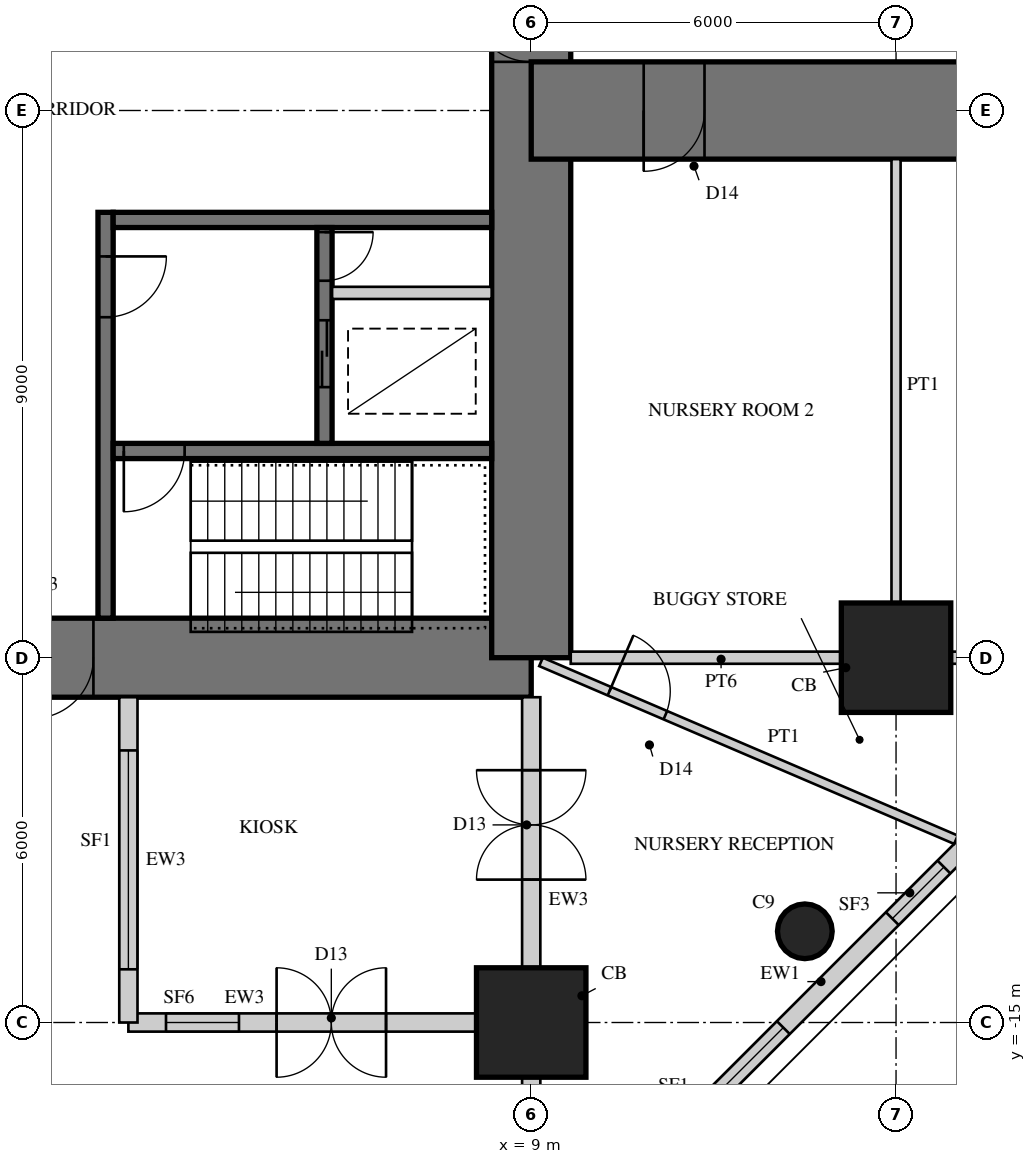
"""IFC4 building model, lengths in metres.
Left out: names, types, materials, properties, quantities, classifications, styles, units other than length and angle.
Written with IfcOpenShell. Run it as: python <this file> out.ifc"""

import sys

from ifc_helpers import new_model, si_unit, direction, frame, frame_2d, origin, origin_2d, place, context, subcontext, project, spatial, rectangle, hollow_rectangle, circle, extrude, element, fill, save


model = new_model("IFC4")
c1 = context("Model", 3, precision=1e-05, world=origin(), true_north=direction((0.0, 1.0)))
c2 = subcontext(c1, "Body", "Model", "MODEL_VIEW")
j1 = project(units=[si_unit("LENGTHUNIT", "METRE"), si_unit("PLANEANGLEUNIT", "RADIAN")], contexts=[c1])
p1 = place(None, origin())
s1 = spatial("IfcSite", under=j1, at=p1, CompositionType="ELEMENT")
p2 = place(p1, origin())
s2 = spatial("IfcBuilding", under=s1, at=p2, CompositionType="ELEMENT")
p3 = place(p2, origin())
s3 = spatial("IfcBuildingStorey", under=s2, at=p3, CompositionType="ELEMENT", Elevation=0.0)
p4 = place(p3, frame((-9.0, -9.0, 0.0), z_axis=(0.0, 0.0, 1.0), x_axis=(1.0, 0.0, 0.0)))
e1 = element("IfcWall", 1, at=p4, inside=s3, PredefinedType="SHEAR", context=c2, shape_type="SweptSolid", body=[
    extrude(rectangle(XDim=18.0, YDim=1.3, at=frame_2d((9.0, 0.0))), origin(), (0.0, 0.0, 1.0), 5.0),
])
p5 = place(p4, frame((9.8, 0.0, 0.0)))
e2 = element("IfcOpeningElement", 2, at=p5, cuts=e1, PredefinedType="OPENING", context=c2, shape_type="SweptSolid", body=[
    extrude(rectangle(XDim=1.0, YDim=2.4, at=frame_2d((0.5, 1.2))), frame((0.0, 0.66, 0.0), z_axis=(0.0, -1.0, 0.0), x_axis=(1.0, 0.0, 0.0)), (0.0, 0.0, 1.0), 1.32),
])
p6 = place(p3, frame((9.0, -9.0, 0.0), z_axis=(0.0, 0.0, 1.0), x_axis=(0.0, 1.0, 0.0)))
e3 = element("IfcWall", 3, at=p6, inside=s3, PredefinedType="SHEAR", context=c2, shape_type="SweptSolid", body=[
    extrude(rectangle(XDim=18.0, YDim=1.3, at=frame_2d((9.0, 0.0))), origin(), (0.0, 0.0, 1.0), 5.0),
])
p7 = place(p6, frame((9.8, 0.0, 0.0)))
e4 = element("IfcOpeningElement", 4, at=p7, cuts=e3, PredefinedType="OPENING", context=c2, shape_type="SweptSolid", body=[
    extrude(rectangle(XDim=1.0, YDim=2.4, at=frame_2d((0.5, 1.2))), frame((0.0, 0.66, 0.0), z_axis=(0.0, -1.0, 0.0), x_axis=(1.0, 0.0, 0.0)), (0.0, 0.0, 1.0), 1.32),
])
p8 = place(p3, frame((2.0, -1.675, 0.0), z_axis=(0.0, 0.0, 1.0), x_axis=(0.0, -1.0, 0.0)))
e5 = element("IfcWall", 5, at=p8, inside=s3, PredefinedType="SHEAR", context=c2, shape_type="SweptSolid", body=[
    extrude(rectangle(XDim=6.675, YDim=0.25, at=frame_2d((3.337, 0.0))), origin(), (0.0, 0.0, 1.0), 5.0),
])
p9 = place(p8, frame((0.725, 0.0, 0.0)))
e6 = element("IfcOpeningElement", 6, at=p9, cuts=e5, PredefinedType="OPENING", context=c2, shape_type="SweptSolid", body=[
    extrude(rectangle(XDim=1.0, YDim=2.1, at=frame_2d((0.5, 1.05))), frame((0.0, 0.135, 0.0), z_axis=(0.0, -1.0, 0.0), x_axis=(1.0, 0.0, 0.0)), (0.0, 0.0, 1.0), 0.27),
])
p10 = place(p3, frame((2.125, -1.8, 0.0), z_axis=(0.0, 0.0, 1.0), x_axis=(1.0, 0.0, 0.0)))
e7 = element("IfcWall", 7, at=p10, inside=s3, PredefinedType="SHEAR", context=c2, shape_type="SweptSolid", body=[
    extrude(rectangle(XDim=6.225, YDim=0.25, at=frame_2d((3.113, 0.0))), origin(), (0.0, 0.0, 1.0), 5.0),
])
p11 = place(p3, frame((2.125, -5.6, 0.0), z_axis=(0.0, 0.0, 1.0), x_axis=(1.0, 0.0, 0.0)))
e8 = element("IfcWall", 8, at=p11, inside=s3, PredefinedType="SHEAR", context=c2, shape_type="SweptSolid", body=[
    extrude(rectangle(XDim=6.225, YDim=0.25, at=frame_2d((3.113, 0.0))), origin(), (0.0, 0.0, 1.0), 5.0),
])
p12 = place(p11, frame((0.175, 0.0, 0.0)))
e9 = element("IfcOpeningElement", 9, at=p12, cuts=e8, PredefinedType="OPENING", context=c2, shape_type="SweptSolid", body=[
    extrude(rectangle(XDim=1.0, YDim=2.1, at=frame_2d((0.5, 1.05))), frame((0.0, 0.135, 0.0), z_axis=(0.0, -1.0, 0.0), x_axis=(1.0, 0.0, 0.0)), (0.0, 0.0, 1.0), 0.27),
])
p13 = place(p3, frame((5.6, -1.925, 0.0), z_axis=(0.0, 0.0, 1.0), x_axis=(0.0, -1.0, 0.0)))
e10 = element("IfcWall", 10, at=p13, inside=s3, PredefinedType="SHEAR", context=c2, shape_type="SweptSolid", body=[
    extrude(rectangle(XDim=3.55, YDim=0.25, at=frame_2d((1.775, 0.0))), origin(), (0.0, 0.0, 1.0), 5.0),
])
p14 = place(p13, frame((1.525, 0.0, 0.0)))
e11 = element("IfcOpeningElement", 11, at=p14, cuts=e10, PredefinedType="OPENING", context=c2, shape_type="SweptSolid", body=[
    extrude(rectangle(XDim=1.1, YDim=2.2, at=frame_2d((0.55, 1.1))), frame((0.0, 0.135, 0.0), z_axis=(0.0, -1.0, 0.0), x_axis=(1.0, 0.0, 0.0)), (0.0, 0.0, 1.0), 0.27),
])
p15 = place(p13, frame((0.075, 0.0, 0.0)))
e12 = element("IfcOpeningElement", 12, at=p15, cuts=e10, PredefinedType="OPENING", context=c2, shape_type="SweptSolid", body=[
    extrude(rectangle(XDim=0.8, YDim=2.1, at=frame_2d((0.4, 1.05))), frame((0.0, 0.135, 0.0), z_axis=(0.0, -1.0, 0.0), x_axis=(1.0, 0.0, 0.0)), (0.0, 0.0, 1.0), 0.27),
])
p16 = place(p3, frame((5.725, -3.0, 0.0), z_axis=(0.0, 0.0, 1.0), x_axis=(1.0, 0.0, 0.0)))
e13 = element("IfcWall", 13, at=p16, inside=s3, PredefinedType="PARTITIONING", context=c2, shape_type="SweptSolid", body=[
    extrude(rectangle(XDim=2.625, YDim=0.2, at=frame_2d((1.312, 0.0))), origin(), (0.0, 0.0, 1.0), 5.0),
])
p17 = place(p3, frame((9.0, 0.0, 0.0), z_axis=(0.0, 0.0, 1.0), x_axis=(1.0, 0.0, 0.0)))
e14 = element("IfcWall", 14, at=p17, inside=s3, PredefinedType="SHEAR", context=c2, shape_type="SweptSolid", body=[
    extrude(rectangle(XDim=18.0, YDim=1.6, at=frame_2d((9.0, 0.0))), origin(), (0.0, 0.0, 1.0), 5.0),
])
p18 = place(p17, frame((1.85, 0.0, 0.0)))
e15 = element("IfcOpeningElement", 15, at=p18, cuts=e14, PredefinedType="OPENING", context=c2, shape_type="SweptSolid", body=[
    extrude(rectangle(XDim=1.0, YDim=2.2, at=frame_2d((0.5, 1.1))), frame((0.0, 0.81, 0.0), z_axis=(0.0, -1.0, 0.0), x_axis=(1.0, 0.0, 0.0)), (0.0, 0.0, 1.0), 1.62),
])
p19 = place(p17, frame((7.2, 0.0, 0.0)))
e16 = element("IfcOpeningElement", 16, at=p19, cuts=e14, PredefinedType="OPENING", context=c2, shape_type="SweptSolid", body=[
    extrude(rectangle(XDim=1.0, YDim=2.2, at=frame_2d((0.5, 1.1))), frame((0.0, 0.81, 0.0), z_axis=(0.0, -1.0, 0.0), x_axis=(1.0, 0.0, 0.0)), (0.0, 0.0, 1.0), 1.62),
])
p20 = place(p17, frame((12.95, 0.0, 0.0)))
e17 = element("IfcOpeningElement", 17, at=p20, cuts=e14, PredefinedType="OPENING", context=c2, shape_type="SweptSolid", body=[
    extrude(rectangle(XDim=1.0, YDim=2.2, at=frame_2d((0.5, 1.1))), frame((0.0, 0.81, 0.0), z_axis=(0.0, -1.0, 0.0), x_axis=(1.0, 0.0, 0.0)), (0.0, 0.0, 1.0), 1.62),
])
for number, where, z_axis, x_axis in (
    (18, (15.0, -9.0, 0.0), (0.0, 0.0, 1.0), (1.0, 0.0, 0.0)),
    (19, (9.0, -15.0, 0.0), (0.0, 0.0, 1.0), (1.0, 0.0, 0.0)),
):
    element("IfcColumn", number, at=place(p3, frame(where, z_axis=z_axis, x_axis=x_axis)), inside=s3, PredefinedType="COLUMN", context=c2, shape_type="SweptSolid", body=[
        extrude(rectangle(XDim=1.8, YDim=1.8, at=origin_2d()), origin(), (0.0, 0.0, 1.0), 5.0),
    ])
p21 = place(p3, frame((13.5, -13.5, 0.0), z_axis=(0.0, 0.0, 1.0), x_axis=(1.0, 0.0, 0.0)))
e20 = element("IfcColumn", 20, at=p21, inside=s3, PredefinedType="COLUMN", context=c2, shape_type="SweptSolid", body=[
    extrude(circle(Radius=0.45, at=origin_2d()), origin(), (0.0, 0.0, 1.0), 5.0),
])
p22 = place(p3, frame((9.87, -18.36, 0.0), z_axis=(0.0, 0.0, 1.0), x_axis=(0.707106781187, 0.707106781187, 0.0)))
e21 = element("IfcWall", 21, at=p22, inside=s3, PredefinedType="SOLIDWALL", context=c2, shape_type="SweptSolid", body=[
    extrude(rectangle(XDim=12.007, YDim=0.3, at=frame_2d((6.003, 0.0))), origin(), (0.0, 0.0, 1.0), 4.8),
])
p23 = place(p22, frame((1.034, 0.0, 0.3)))
e22 = element("IfcOpeningElement", 22, at=p23, cuts=e21, PredefinedType="OPENING", context=c2, shape_type="SweptSolid", body=[
    extrude(rectangle(XDim=3.6, YDim=3.9, at=frame_2d((1.8, 1.95))), frame((0.0, 0.16, 0.0), z_axis=(0.0, -1.0, 0.0), x_axis=(1.0, 0.0, 0.0)), (0.0, 0.0, 1.0), 0.32),
])
p24 = place(p22, frame((7.169, 0.0, 0.3)))
e23 = element("IfcOpeningElement", 23, at=p24, cuts=e21, PredefinedType="OPENING", context=c2, shape_type="SweptSolid", body=[
    extrude(rectangle(XDim=1.2, YDim=3.9, at=frame_2d((0.6, 1.95))), frame((0.0, 0.16, 0.0), z_axis=(0.0, -1.0, 0.0), x_axis=(1.0, 0.0, 0.0)), (0.0, 0.0, 1.0), 0.32),
])
p25 = place(p22, frame((9.702, 0.0, 0.3)))
e24 = element("IfcOpeningElement", 24, at=p25, cuts=e21, PredefinedType="OPENING", context=c2, shape_type="SweptSolid", body=[
    extrude(rectangle(XDim=1.2, YDim=3.9, at=frame_2d((0.6, 1.95))), frame((0.0, 0.16, 0.0), z_axis=(0.0, -1.0, 0.0), x_axis=(1.0, 0.0, 0.0)), (0.0, 0.0, 1.0), 0.32),
])
p26 = place(p3, frame((15.0, -8.25, 0.0), z_axis=(0.0, 0.0, 1.0), x_axis=(0.0, 1.0, 0.0)))
e25 = element("IfcWall", 25, at=p26, inside=s3, PredefinedType="PARTITIONING", context=c2, shape_type="SweptSolid", body=[
    extrude(rectangle(XDim=7.45, YDim=0.15, at=frame_2d((3.725, 0.0))), origin(), (0.0, 0.0, 1.0), 3.85),
])
p27 = place(p3, frame((2.375, -15.0, 0.0), z_axis=(0.0, 0.0, 1.0), x_axis=(1.0, 0.0, 0.0)))
e26 = element("IfcWall", 26, at=p27, inside=s3, PredefinedType="SOLIDWALL", context=c2, shape_type="SweptSolid", body=[
    extrude(rectangle(XDim=5.875, YDim=0.3, at=frame_2d((2.938, 0.0))), origin(), (0.0, 0.0, 1.0), 3.85),
])
p28 = place(p27, frame((2.438, 0.0, 0.0)))
e27 = element("IfcOpeningElement", 27, at=p28, cuts=e26, PredefinedType="OPENING", context=c2, shape_type="SweptSolid", body=[
    extrude(rectangle(XDim=1.8, YDim=2.4, at=frame_2d((0.9, 1.2))), frame((0.0, 0.16, 0.0), z_axis=(0.0, -1.0, 0.0), x_axis=(1.0, 0.0, 0.0)), (0.0, 0.0, 1.0), 0.32),
])
p29 = place(p27, frame((0.619, 0.0, 0.3)))
e28 = element("IfcOpeningElement", 28, at=p29, cuts=e26, PredefinedType="OPENING", context=c2, shape_type="SweptSolid", body=[
    extrude(rectangle(XDim=1.2, YDim=3.4, at=frame_2d((0.6, 1.7))), frame((0.0, 0.16, 0.0), z_axis=(0.0, -1.0, 0.0), x_axis=(1.0, 0.0, 0.0)), (0.0, 0.0, 1.0), 0.32),
])
p30 = place(p3, frame((2.375, -9.65, 0.0), z_axis=(0.0, 0.0, 1.0), x_axis=(0.0, -1.0, 0.0)))
e29 = element("IfcWall", 29, at=p30, inside=s3, PredefinedType="SOLIDWALL", context=c2, shape_type="SweptSolid", body=[
    extrude(rectangle(XDim=5.35, YDim=0.3, at=frame_2d((2.675, 0.0))), origin(), (0.0, 0.0, 1.0), 4.8),
])
p31 = place(p30, frame((0.875, 0.0, 0.3)))
e30 = element("IfcOpeningElement", 30, at=p31, cuts=e29, PredefinedType="OPENING", context=c2, shape_type="SweptSolid", body=[
    extrude(rectangle(XDim=3.6, YDim=3.9, at=frame_2d((1.8, 1.95))), frame((0.0, 0.16, 0.0), z_axis=(0.0, -1.0, 0.0), x_axis=(1.0, 0.0, 0.0)), (0.0, 0.0, 1.0), 0.32),
])
p32 = place(p3, frame((9.161, -9.069, 0.0), z_axis=(0.0, 0.0, 1.0), x_axis=(0.919138226556, -0.393935172945, 0.0)))
e31 = element("IfcWall", 31, at=p32, inside=s3, PredefinedType="PARTITIONING", context=c2, shape_type="SweptSolid", body=[
    extrude(rectangle(XDim=7.425, YDim=0.15, at=frame_2d((3.712, 0.0))), origin(), (0.0, 0.0, 1.0), 4.8),
])
p33 = place(p32, frame((1.225, 0.0, 0.0)))
e32 = element("IfcOpeningElement", 32, at=p33, cuts=e31, PredefinedType="OPENING", context=c2, shape_type="SweptSolid", body=[
    extrude(rectangle(XDim=1.0, YDim=2.2, at=frame_2d((0.5, 1.1))), frame((0.0, 0.085, 0.0), z_axis=(0.0, -1.0, 0.0), x_axis=(1.0, 0.0, 0.0)), (0.0, 0.0, 1.0), 0.17),
])
p34 = place(p3, frame((9.0, -9.65, 0.0), z_axis=(0.0, 0.0, 1.0), x_axis=(0.0, -1.0, 0.0)))
e33 = element("IfcWall", 33, at=p34, inside=s3, PredefinedType="SOLIDWALL", context=c2, shape_type="SweptSolid", body=[
    extrude(rectangle(XDim=4.6, YDim=0.3, at=frame_2d((2.3, 0.0))), origin(), (0.0, 0.0, 1.0), 3.8),
])
p35 = place(p34, frame((1.2, 0.0, 0.0)))
e34 = element("IfcOpeningElement", 34, at=p35, cuts=e33, PredefinedType="OPENING", context=c2, shape_type="SweptSolid", body=[
    extrude(rectangle(XDim=1.8, YDim=2.4, at=frame_2d((0.9, 1.2))), frame((0.0, 0.16, 0.0), z_axis=(0.0, -1.0, 0.0), x_axis=(1.0, 0.0, 0.0)), (0.0, 0.0, 1.0), 0.32),
])
p36 = place(p3, frame((9.0, -15.75, 0.0), z_axis=(0.0, 0.0, 1.0), x_axis=(0.0, -1.0, 0.0)))
e35 = element("IfcWall", 35, at=p36, inside=s3, PredefinedType="SOLIDWALL", context=c2, shape_type="SweptSolid", body=[
    extrude(rectangle(XDim=7.5, YDim=0.3, at=frame_2d((3.75, 0.0))), origin(), (0.0, 0.0, 1.0), 3.8),
])
p37 = place(p36, frame((2.7, 0.0, 0.0)))
e36 = element("IfcOpeningElement", 36, at=p37, cuts=e35, PredefinedType="OPENING", context=c2, shape_type="SweptSolid", body=[
    extrude(rectangle(XDim=1.8, YDim=2.4, at=frame_2d((0.9, 1.2))), frame((0.0, 0.16, 0.0), z_axis=(0.0, -1.0, 0.0), x_axis=(1.0, 0.0, 0.0)), (0.0, 0.0, 1.0), 0.32),
])
p38 = place(p36, frame((1.212, 0.0, 0.3)))
e37 = element("IfcOpeningElement", 37, at=p38, cuts=e35, PredefinedType="OPENING", context=c2, shape_type="SweptSolid", body=[
    extrude(rectangle(XDim=0.6, YDim=3.4, at=frame_2d((0.3, 1.7))), frame((0.0, 0.16, 0.0), z_axis=(0.0, -1.0, 0.0), x_axis=(1.0, 0.0, 0.0)), (0.0, 0.0, 1.0), 0.32),
])
p39 = place(p36, frame((4.66, 0.0, 0.3)))
e38 = element("IfcOpeningElement", 38, at=p39, cuts=e35, PredefinedType="OPENING", context=c2, shape_type="SweptSolid", body=[
    extrude(rectangle(XDim=0.6, YDim=3.4, at=frame_2d((0.3, 1.7))), frame((0.0, 0.16, 0.0), z_axis=(0.0, -1.0, 0.0), x_axis=(1.0, 0.0, 0.0)), (0.0, 0.0, 1.0), 0.32),
])
p40 = place(p36, frame((2.7, 0.0, 2.6)))
e39 = element("IfcOpeningElement", 39, at=p40, cuts=e35, PredefinedType="OPENING", context=c2, shape_type="SweptSolid", body=[
    extrude(rectangle(XDim=1.8, YDim=1.1, at=frame_2d((0.9, 0.55))), frame((0.0, 0.16, 0.0), z_axis=(0.0, -1.0, 0.0), x_axis=(1.0, 0.0, 0.0)), (0.0, 0.0, 1.0), 0.32),
])
p41 = place(p3, frame((14.25, -9.0, 0.0), z_axis=(0.0, 0.0, 1.0), x_axis=(-1.0, 0.0, 0.0)))
e40 = element("IfcWall", 40, at=p41, inside=s3, PredefinedType="SOLIDWALL", context=c2, shape_type="SweptSolid", body=[
    extrude(rectangle(XDim=4.6, YDim=0.2, at=frame_2d((2.3, 0.0))), origin(), (0.0, 0.0, 1.0), 3.8),
])
p42 = place(p3, frame((18.0, -9.0, 0.0), z_axis=(0.0, 0.0, 1.0), x_axis=(-1.0, 0.0, 0.0)))
e41 = element("IfcWall", 41, at=p42, inside=s3, PredefinedType="SOLIDWALL", context=c2, shape_type="SweptSolid", body=[
    extrude(rectangle(XDim=2.25, YDim=0.2, at=frame_2d((1.125, 0.0))), origin(), (0.0, 0.0, 1.0), 3.8),
])
p43 = place(p23, origin())
e42 = element("IfcWindow", 42, at=p43, inside=s3, PartitioningType="SINGLE_PANEL", PredefinedType="WINDOW", context=c2, shape_type="SweptSolid", body=[
    extrude(hollow_rectangle(XDim=3.6, YDim=3.9, WallThickness=0.06, at=frame_2d((1.8, 1.95))), frame((0.0, 0.03, 0.0), z_axis=(0.0, -1.0, 0.0), x_axis=(1.0, 0.0, 0.0)), (0.0, 0.0, 1.0), 0.06),
    extrude(rectangle(XDim=3.479, YDim=3.779, at=frame_2d((1.8, 1.95))), frame((0.0, 0.03, 0.0), z_axis=(0.0, -1.0, 0.0), x_axis=(1.0, 0.0, 0.0)), (0.0, 0.0, 1.0), 0.06),
])
fill(e22, e42)
p44 = place(p24, origin())
e43 = element("IfcWindow", 43, at=p44, inside=s3, PartitioningType="SINGLE_PANEL", PredefinedType="WINDOW", context=c2, shape_type="SweptSolid", body=[
    extrude(hollow_rectangle(XDim=1.2, YDim=3.9, WallThickness=0.06, at=frame_2d((0.6, 1.95))), frame((0.0, 0.03, 0.0), z_axis=(0.0, -1.0, 0.0), x_axis=(1.0, 0.0, 0.0)), (0.0, 0.0, 1.0), 0.06),
    extrude(rectangle(XDim=1.079, YDim=3.779, at=frame_2d((0.6, 1.95))), frame((0.0, 0.03, 0.0), z_axis=(0.0, -1.0, 0.0), x_axis=(1.0, 0.0, 0.0)), (0.0, 0.0, 1.0), 0.06),
])
fill(e23, e43)
p45 = place(p28, origin())
e44 = element("IfcDoor", 44, at=p45, inside=s3, OperationType="DOUBLE_DOOR_DOUBLE_SWING", PredefinedType="DOOR", context=c2, shape_type="SweptSolid", body=[
    extrude(hollow_rectangle(XDim=1.8, YDim=2.4, WallThickness=0.06, at=frame_2d((0.9, 1.2))), frame((0.0, 0.025, 0.0), z_axis=(0.0, -1.0, 0.0), x_axis=(1.0, 0.0, 0.0)), (0.0, 0.0, 1.0), 0.05),
    extrude(rectangle(XDim=1.679, YDim=2.279, at=frame_2d((0.9, 1.2))), frame((0.0, 0.025, 0.0), z_axis=(0.0, -1.0, 0.0), x_axis=(1.0, 0.0, 0.0)), (0.0, 0.0, 1.0), 0.05),
])
fill(e27, e44)
p46 = place(p29, origin())
e45 = element("IfcWindow", 45, at=p46, inside=s3, PartitioningType="SINGLE_PANEL", PredefinedType="WINDOW", context=c2, shape_type="SweptSolid", body=[
    extrude(hollow_rectangle(XDim=1.2, YDim=3.4, WallThickness=0.06, at=frame_2d((0.6, 1.7))), frame((0.0, 0.03, 0.0), z_axis=(0.0, -1.0, 0.0), x_axis=(1.0, 0.0, 0.0)), (0.0, 0.0, 1.0), 0.06),
    extrude(rectangle(XDim=1.079, YDim=3.279, at=frame_2d((0.6, 1.7))), frame((0.0, 0.03, 0.0), z_axis=(0.0, -1.0, 0.0), x_axis=(1.0, 0.0, 0.0)), (0.0, 0.0, 1.0), 0.06),
])
fill(e28, e45)
p47 = place(p31, origin())
e46 = element("IfcWindow", 46, at=p47, inside=s3, PartitioningType="SINGLE_PANEL", PredefinedType="WINDOW", context=c2, shape_type="SweptSolid", body=[
    extrude(hollow_rectangle(XDim=3.6, YDim=3.9, WallThickness=0.06, at=frame_2d((1.8, 1.95))), frame((0.0, 0.03, 0.0), z_axis=(0.0, -1.0, 0.0), x_axis=(1.0, 0.0, 0.0)), (0.0, 0.0, 1.0), 0.06),
    extrude(rectangle(XDim=3.479, YDim=3.779, at=frame_2d((1.8, 1.95))), frame((0.0, 0.03, 0.0), z_axis=(0.0, -1.0, 0.0), x_axis=(1.0, 0.0, 0.0)), (0.0, 0.0, 1.0), 0.06),
])
fill(e30, e46)
p48 = place(p33, origin())
e47 = element("IfcDoor", 47, at=p48, inside=s3, OperationType="SINGLE_SWING_LEFT", PredefinedType="DOOR", context=c2, shape_type="SweptSolid", body=[
    extrude(rectangle(XDim=1.0, YDim=2.2, at=frame_2d((0.5, 1.1))), frame((0.0, 0.025, 0.0), z_axis=(0.0, -1.0, 0.0), x_axis=(1.0, 0.0, 0.0)), (0.0, 0.0, 1.0), 0.05),
])
fill(e32, e47)
p49 = place(p35, origin())
e48 = element("IfcDoor", 48, at=p49, inside=s3, OperationType="DOUBLE_DOOR_DOUBLE_SWING", PredefinedType="DOOR", context=c2, shape_type="SweptSolid", body=[
    extrude(hollow_rectangle(XDim=1.8, YDim=2.4, WallThickness=0.06, at=frame_2d((0.9, 1.2))), frame((0.0, 0.025, 0.0), z_axis=(0.0, -1.0, 0.0), x_axis=(1.0, 0.0, 0.0)), (0.0, 0.0, 1.0), 0.05),
    extrude(rectangle(XDim=1.679, YDim=2.279, at=frame_2d((0.9, 1.2))), frame((0.0, 0.025, 0.0), z_axis=(0.0, -1.0, 0.0), x_axis=(1.0, 0.0, 0.0)), (0.0, 0.0, 1.0), 0.05),
])
fill(e34, e48)
p50 = place(p18, frame((1.0, 0.0, 0.0), z_axis=(0.0, 0.0, 1.0), x_axis=(-1.0, 0.0, 0.0)))
e49 = element("IfcDoor", 49, at=p50, inside=s3, OperationType="SINGLE_SWING_RIGHT", PredefinedType="DOOR", context=c2, shape_type="SweptSolid", body=[
    extrude(rectangle(XDim=1.0, YDim=2.2, at=frame_2d((0.5, 1.1))), frame((0.0, 0.025, 0.0), z_axis=(0.0, -1.0, 0.0), x_axis=(1.0, 0.0, 0.0)), (0.0, 0.0, 1.0), 0.05),
])
fill(e15, e49)
p51 = place(p5, frame((1.0, 0.0, 0.0), z_axis=(0.0, 0.0, 1.0), x_axis=(-1.0, 0.0, 0.0)))
e50 = element("IfcDoor", 50, at=p51, inside=s3, OperationType="SINGLE_SWING_RIGHT", PredefinedType="DOOR", context=c2, shape_type="SweptSolid", body=[
    extrude(rectangle(XDim=1.0, YDim=2.4, at=frame_2d((0.5, 1.2))), frame((0.0, -0.005, 0.0), z_axis=(0.0, -1.0, 0.0), x_axis=(1.0, 0.0, 0.0)), (0.0, 0.0, 1.0), 0.05),
])
fill(e2, e50)
p52 = place(p7, origin())
e51 = element("IfcDoor", 51, at=p52, inside=s3, OperationType="SINGLE_SWING_RIGHT", PredefinedType="DOOR", context=c2, shape_type="SweptSolid", body=[
    extrude(rectangle(XDim=1.0, YDim=2.4, at=frame_2d((0.5, 1.2))), frame((0.0, 0.055, 0.0), z_axis=(0.0, -1.0, 0.0), x_axis=(1.0, 0.0, 0.0)), (0.0, 0.0, 1.0), 0.05),
])
fill(e4, e51)
p53 = place(p9, origin())
e52 = element("IfcDoor", 52, at=p53, inside=s3, OperationType="SINGLE_SWING_LEFT", PredefinedType="DOOR", context=c2, shape_type="SweptSolid", body=[
    extrude(rectangle(XDim=1.0, YDim=2.1, at=frame_2d((0.5, 1.05))), frame((0.0, 0.025, 0.0), z_axis=(0.0, -1.0, 0.0), x_axis=(1.0, 0.0, 0.0)), (0.0, 0.0, 1.0), 0.05),
])
fill(e6, e52)
p54 = place(p12, frame((1.0, 0.0, 0.0), z_axis=(0.0, 0.0, 1.0), x_axis=(-1.0, 0.0, 0.0)))
e53 = element("IfcDoor", 53, at=p54, inside=s3, OperationType="SINGLE_SWING_RIGHT", PredefinedType="DOOR", context=c2, shape_type="SweptSolid", body=[
    extrude(rectangle(XDim=1.0, YDim=2.1, at=frame_2d((0.5, 1.05))), frame((0.0, 0.025, 0.0), z_axis=(0.0, -1.0, 0.0), x_axis=(1.0, 0.0, 0.0)), (0.0, 0.0, 1.0), 0.05),
])
fill(e9, e53)
p55 = place(p14, origin())
e54 = element("IfcDoor", 54, at=p55, inside=s3, OperationType="DOUBLE_DOOR_SLIDING", PredefinedType="DOOR", context=c2, shape_type="SweptSolid", body=[
    extrude(rectangle(XDim=1.1, YDim=2.2, at=frame_2d((0.55, 1.1))), frame((0.0, 0.025, 0.0), z_axis=(0.0, -1.0, 0.0), x_axis=(1.0, 0.0, 0.0)), (0.0, 0.0, 1.0), 0.05),
])
fill(e11, e54)
p56 = place(p15, origin())
e55 = element("IfcDoor", 55, at=p56, inside=s3, OperationType="SINGLE_SWING_LEFT", PredefinedType="DOOR", context=c2, shape_type="SweptSolid", body=[
    extrude(rectangle(XDim=0.8, YDim=2.1, at=frame_2d((0.4, 1.05))), frame((0.0, 0.025, 0.0), z_axis=(0.0, -1.0, 0.0), x_axis=(1.0, 0.0, 0.0)), (0.0, 0.0, 1.0), 0.05),
])
fill(e12, e55)
save(model, sys.argv[1])
